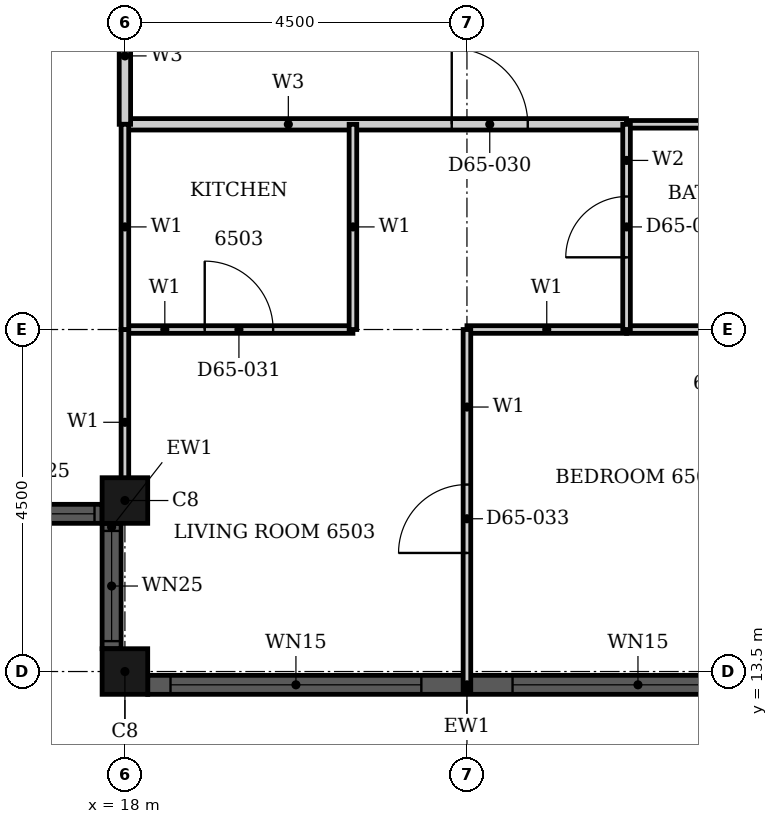
"""IFC4 building model, lengths in metres.
Left out: names, types, materials, properties, quantities, classifications, styles, units other than length and angle.
Written with IfcOpenShell. Run it as: python <this file> out.ifc"""

import sys

from ifc_helpers import new_model, si_unit, direction, frame, frame_2d, origin, origin_2d, place, context, subcontext, project, spatial, rectangle, hollow_rectangle, extrude, element, fill, save


model = new_model("IFC4")
c1 = context("Model", 3, precision=1e-05, world=origin(), true_north=direction((0.0, 1.0)))
c2 = subcontext(c1, "Body", "Model", "MODEL_VIEW")
j1 = project(units=[si_unit("LENGTHUNIT", "METRE"), si_unit("PLANEANGLEUNIT", "RADIAN")], contexts=[c1])
p1 = place(None, origin())
s1 = spatial("IfcSite", under=j1, at=p1, CompositionType="ELEMENT")
p2 = place(p1, origin())
s2 = spatial("IfcBuilding", under=s1, at=p2, CompositionType="ELEMENT")
p3 = place(p2, frame((0.0, 0.0, 256.4)))
s3 = spatial("IfcBuildingStorey", under=s2, at=p3, CompositionType="ELEMENT", Elevation=256.4)
for number, where, z_axis, x_axis in (
    (1, (18.0, 15.75, 0.0), (0.0, 0.0, 1.0), (1.0, 0.0, 0.0)),
    (2, (18.0, 13.5, 0.0), (0.0, 0.0, 1.0), (1.0, 0.0, 0.0)),
):
    element("IfcColumn", number, at=place(p3, frame(where, z_axis=z_axis, x_axis=x_axis)), inside=s3, PredefinedType="COLUMN", context=c2, shape_type="SweptSolid", body=[
        extrude(hollow_rectangle(XDim=0.6, YDim=0.6, WallThickness=0.02, at=origin_2d()), origin(), (0.0, 0.0, 1.0), 3.7),
    ])
p4 = place(p3, frame((16.05, 15.575, 0.0), z_axis=(0.0, 0.0, 1.0), x_axis=(1.0, 0.0, 0.0)))
e3 = element("IfcWall", 3, at=p4, inside=s3, PredefinedType="SOLIDWALL", context=c2, shape_type="SweptSolid", body=[
    extrude(rectangle(XDim=1.65, YDim=0.25, at=frame_2d((0.825, 0.0))), origin(), (0.0, 0.0, 1.0), 3.7),
])
p5 = place(p4, frame((0.1, 0.0, 0.9)))
e4 = element("IfcOpeningElement", 4, at=p5, cuts=e3, PredefinedType="OPENING", context=c2, shape_type="SweptSolid", body=[
    extrude(rectangle(XDim=1.45, YDim=1.85, at=frame_2d((0.725, 0.925))), frame((0.0, 0.135, 0.0), z_axis=(0.0, -1.0, 0.0), x_axis=(1.0, 0.0, 0.0)), (0.0, 0.0, 1.0), 0.27),
])
p6 = place(p3, frame((17.825, 15.45, 0.0), z_axis=(0.0, 0.0, 1.0), x_axis=(0.0, -1.0, 0.0)))
e5 = element("IfcWall", 5, at=p6, inside=s3, PredefinedType="SOLIDWALL", context=c2, shape_type="SweptSolid", body=[
    extrude(rectangle(XDim=1.65, YDim=0.25, at=frame_2d((0.825, 0.0))), origin(), (0.0, 0.0, 1.0), 3.7),
])
p7 = place(p6, frame((0.1, 0.0, 0.9)))
e6 = element("IfcOpeningElement", 6, at=p7, cuts=e5, PredefinedType="OPENING", context=c2, shape_type="SweptSolid", body=[
    extrude(rectangle(XDim=1.45, YDim=1.85, at=frame_2d((0.725, 0.925))), frame((0.0, 0.135, 0.0), z_axis=(0.0, -1.0, 0.0), x_axis=(1.0, 0.0, 0.0)), (0.0, 0.0, 1.0), 0.27),
])
p8 = place(p3, frame((18.3, 13.325, 0.0), z_axis=(0.0, 0.0, 1.0), x_axis=(1.0, 0.0, 0.0)))
e7 = element("IfcWall", 7, at=p8, inside=s3, PredefinedType="SOLIDWALL", context=c2, shape_type="SweptSolid", body=[
    extrude(rectangle(XDim=8.4, YDim=0.25, at=frame_2d((4.2, 0.0))), origin(), (0.0, 0.0, 1.0), 3.7),
])
p9 = place(p8, frame((0.3, 0.0, 0.45)))
e8 = element("IfcOpeningElement", 8, at=p9, cuts=e7, PredefinedType="OPENING", context=c2, shape_type="SweptSolid", body=[
    extrude(rectangle(XDim=3.3, YDim=2.3, at=frame_2d((1.65, 1.15))), frame((0.0, 0.135, 0.0), z_axis=(0.0, -1.0, 0.0), x_axis=(1.0, 0.0, 0.0)), (0.0, 0.0, 1.0), 0.27),
])
p10 = place(p8, frame((4.8, 0.0, 0.45)))
e9 = element("IfcOpeningElement", 9, at=p10, cuts=e7, PredefinedType="OPENING", context=c2, shape_type="SweptSolid", body=[
    extrude(rectangle(XDim=3.3, YDim=2.3, at=frame_2d((1.65, 1.15))), frame((0.0, 0.135, 0.0), z_axis=(0.0, -1.0, 0.0), x_axis=(1.0, 0.0, 0.0)), (0.0, 0.0, 1.0), 0.27),
])
p11 = place(p3, frame((18.0, 20.7, 0.0), z_axis=(0.0, 0.0, 1.0), x_axis=(1.0, 0.0, 0.0)))
e10 = element("IfcWall", 10, at=p11, inside=s3, PredefinedType="PARTITIONING", context=c2, shape_type="SweptSolid", body=[
    extrude(rectangle(XDim=6.6, YDim=0.15, at=frame_2d((3.3, 0.0))), origin(), (0.0, 0.0, 1.0), 3.4),
])
p12 = place(p11, frame((4.3, 0.0, 0.0)))
e11 = element("IfcOpeningElement", 11, at=p12, cuts=e10, PredefinedType="OPENING", context=c2, shape_type="SweptSolid", body=[
    extrude(rectangle(XDim=1.0, YDim=2.2, at=frame_2d((0.5, 1.1))), frame((0.0, 0.085, 0.0), z_axis=(0.0, -1.0, 0.0), x_axis=(1.0, 0.0, 0.0)), (0.0, 0.0, 1.0), 0.17),
])
p13 = place(p3, frame((18.0, 20.7, 0.0), z_axis=(0.0, 0.0, 1.0), x_axis=(0.0, 1.0, 0.0)))
e12 = element("IfcWall", 12, at=p13, inside=s3, PredefinedType="PARTITIONING", context=c2, shape_type="SweptSolid", body=[
    extrude(rectangle(XDim=1.8, YDim=0.15, at=frame_2d((0.9, 0.0))), origin(), (0.0, 0.0, 1.0), 3.4),
])
p14 = place(p3, frame((22.5, 18.0, 0.0), z_axis=(0.0, 0.0, 1.0), x_axis=(1.0, 0.0, 0.0)))
e13 = element("IfcWall", 13, at=p14, inside=s3, PredefinedType="PARTITIONING", context=c2, shape_type="SweptSolid", body=[
    extrude(rectangle(XDim=2.1, YDim=0.1, at=frame_2d((1.05, 0.0))), origin(), (0.0, 0.0, 1.0), 3.4),
])
p15 = place(p3, frame((18.0, 18.0, 0.0), z_axis=(0.0, 0.0, 1.0), x_axis=(1.0, 0.0, 0.0)))
e14 = element("IfcWall", 14, at=p15, inside=s3, PredefinedType="PARTITIONING", context=c2, shape_type="SweptSolid", body=[
    extrude(rectangle(XDim=3.0, YDim=0.1, at=frame_2d((1.5, 0.0))), origin(), (0.0, 0.0, 1.0), 3.4),
])
p16 = place(p15, frame((1.05, 0.0, 0.0)))
e15 = element("IfcOpeningElement", 15, at=p16, cuts=e14, PredefinedType="OPENING", context=c2, shape_type="SweptSolid", body=[
    extrude(rectangle(XDim=0.9, YDim=2.1, at=frame_2d((0.45, 1.05))), frame((0.0, 0.06, 0.0), z_axis=(0.0, -1.0, 0.0), x_axis=(1.0, 0.0, 0.0)), (0.0, 0.0, 1.0), 0.12),
])
p17 = place(p3, frame((18.0, 15.56, 0.0), z_axis=(0.0, 0.0, 1.0), x_axis=(0.0, 1.0, 0.0)))
e16 = element("IfcWall", 16, at=p17, inside=s3, PredefinedType="PARTITIONING", context=c2, shape_type="SweptSolid", body=[
    extrude(rectangle(XDim=2.439, YDim=0.1, at=frame_2d((1.219, 0.0))), origin(), (0.0, 0.0, 1.0), 3.4),
])
for number, where, z_axis, x_axis in (
    (17, (18.0, 18.0, 0.0), (0.0, 0.0, 1.0), (0.0, 1.0, 0.0)),
    (18, (21.0, 18.0, 0.0), (0.0, 0.0, 1.0), (0.0, 1.0, 0.0)),
):
    element("IfcWall", number, at=place(p3, frame(where, z_axis=z_axis, x_axis=x_axis)), inside=s3, PredefinedType="PARTITIONING", context=c2, shape_type="SweptSolid", body=[
        extrude(rectangle(XDim=2.7, YDim=0.1, at=frame_2d((1.35, 0.0))), origin(), (0.0, 0.0, 1.0), 3.4),
    ])
p18 = place(p3, frame((22.5, 13.26, 0.0), z_axis=(0.0, 0.0, 1.0), x_axis=(0.0, 1.0, 0.0)))
e19 = element("IfcWall", 19, at=p18, inside=s3, PredefinedType="PARTITIONING", context=c2, shape_type="SweptSolid", body=[
    extrude(rectangle(XDim=4.74, YDim=0.1, at=frame_2d((2.37, 0.0))), origin(), (0.0, 0.0, 1.0), 3.4),
])
p19 = place(p18, frame((1.8, 0.0, 0.0)))
e20 = element("IfcOpeningElement", 20, at=p19, cuts=e19, PredefinedType="OPENING", context=c2, shape_type="SweptSolid", body=[
    extrude(rectangle(XDim=0.9, YDim=2.1, at=frame_2d((0.45, 1.05))), frame((0.0, 0.06, 0.0), z_axis=(0.0, -1.0, 0.0), x_axis=(1.0, 0.0, 0.0)), (0.0, 0.0, 1.0), 0.12),
])
for number, where, z_axis, x_axis in (
    (21, (24.6, 18.0, 0.0), (0.0, 0.0, 1.0), (1.0, 0.0, 0.0)),
    (22, (24.6, 20.7, 0.0), (0.0, 0.0, 1.0), (1.0, 0.0, 0.0)),
):
    element("IfcWall", number, at=place(p3, frame(where, z_axis=z_axis, x_axis=x_axis)), inside=s3, PredefinedType="PARTITIONING", context=c2, shape_type="SweptSolid", body=[
        extrude(rectangle(XDim=2.4, YDim=0.1, at=frame_2d((1.2, 0.0))), origin(), (0.0, 0.0, 1.0), 3.4),
    ])
p20 = place(p3, frame((24.6, 18.0, 0.0), z_axis=(0.0, 0.0, 1.0), x_axis=(0.0, 1.0, 0.0)))
e23 = element("IfcWall", 23, at=p20, inside=s3, PredefinedType="PARTITIONING", context=c2, shape_type="SweptSolid", body=[
    extrude(rectangle(XDim=2.7, YDim=0.1, at=frame_2d((1.35, 0.0))), origin(), (0.0, 0.0, 1.0), 3.4),
])
p21 = place(p20, frame((0.95, 0.0, 0.0)))
e24 = element("IfcOpeningElement", 24, at=p21, cuts=e23, PredefinedType="OPENING", context=c2, shape_type="SweptSolid", body=[
    extrude(rectangle(XDim=0.8, YDim=2.1, at=frame_2d((0.4, 1.05))), frame((0.0, 0.06, 0.0), z_axis=(0.0, -1.0, 0.0), x_axis=(1.0, 0.0, 0.0)), (0.0, 0.0, 1.0), 0.12),
])
p22 = place(p5, origin())
e25 = element("IfcWindow", 25, at=p22, inside=s3, PartitioningType="SINGLE_PANEL", PredefinedType="WINDOW", context=c2, shape_type="SweptSolid", body=[
    extrude(rectangle(XDim=1.45, YDim=1.85, at=frame_2d((0.725, 0.925))), frame((0.0, 0.03, 0.0), z_axis=(0.0, -1.0, 0.0), x_axis=(1.0, 0.0, 0.0)), (0.0, 0.0, 1.0), 0.06),
])
fill(e4, e25)
p23 = place(p7, origin())
e26 = element("IfcWindow", 26, at=p23, inside=s3, PartitioningType="SINGLE_PANEL", PredefinedType="WINDOW", context=c2, shape_type="SweptSolid", body=[
    extrude(rectangle(XDim=1.45, YDim=1.85, at=frame_2d((0.725, 0.925))), frame((0.0, 0.03, 0.0), z_axis=(0.0, -1.0, 0.0), x_axis=(1.0, 0.0, 0.0)), (0.0, 0.0, 1.0), 0.06),
])
fill(e6, e26)
p24 = place(p9, origin())
e27 = element("IfcWindow", 27, at=p24, inside=s3, PartitioningType="SINGLE_PANEL", PredefinedType="WINDOW", context=c2, shape_type="SweptSolid", body=[
    extrude(rectangle(XDim=3.3, YDim=2.3, at=frame_2d((1.65, 1.15))), frame((0.0, 0.03, 0.0), z_axis=(0.0, -1.0, 0.0), x_axis=(1.0, 0.0, 0.0)), (0.0, 0.0, 1.0), 0.06),
])
fill(e8, e27)
p25 = place(p10, origin())
e28 = element("IfcWindow", 28, at=p25, inside=s3, PartitioningType="SINGLE_PANEL", PredefinedType="WINDOW", context=c2, shape_type="SweptSolid", body=[
    extrude(rectangle(XDim=3.3, YDim=2.3, at=frame_2d((1.65, 1.15))), frame((0.0, 0.03, 0.0), z_axis=(0.0, -1.0, 0.0), x_axis=(1.0, 0.0, 0.0)), (0.0, 0.0, 1.0), 0.06),
])
fill(e9, e28)
p26 = place(p12, origin())
e29 = element("IfcDoor", 29, at=p26, inside=s3, OperationType="SINGLE_SWING_LEFT", PredefinedType="DOOR", context=c2, shape_type="SweptSolid", body=[
    extrude(rectangle(XDim=1.0, YDim=2.2, at=frame_2d((0.5, 1.1))), frame((0.0, 0.025, 0.0), z_axis=(0.0, -1.0, 0.0), x_axis=(1.0, 0.0, 0.0)), (0.0, 0.0, 1.0), 0.05),
])
fill(e11, e29)
p27 = place(p16, origin())
e30 = element("IfcDoor", 30, at=p27, inside=s3, OperationType="SINGLE_SWING_RIGHT", PredefinedType="DOOR", context=c2, shape_type="SweptSolid", body=[
    extrude(rectangle(XDim=0.9, YDim=2.1, at=frame_2d((0.45, 1.05))), frame((0.0, 0.025, 0.0), z_axis=(0.0, -1.0, 0.0), x_axis=(1.0, 0.0, 0.0)), (0.0, 0.0, 1.0), 0.05),
])
fill(e15, e30)
p28 = place(p21, origin())
e31 = element("IfcDoor", 31, at=p28, inside=s3, OperationType="SINGLE_SWING_RIGHT", PredefinedType="DOOR", context=c2, shape_type="SweptSolid", body=[
    extrude(rectangle(XDim=0.8, YDim=2.1, at=frame_2d((0.4, 1.05))), frame((0.0, 0.025, 0.0), z_axis=(0.0, -1.0, 0.0), x_axis=(1.0, 0.0, 0.0)), (0.0, 0.0, 1.0), 0.05),
])
fill(e24, e31)
p29 = place(p19, origin())
e32 = element("IfcDoor", 32, at=p29, inside=s3, OperationType="SINGLE_SWING_RIGHT", PredefinedType="DOOR", context=c2, shape_type="SweptSolid", body=[
    extrude(rectangle(XDim=0.9, YDim=2.1, at=frame_2d((0.45, 1.05))), frame((0.0, 0.025, 0.0), z_axis=(0.0, -1.0, 0.0), x_axis=(1.0, 0.0, 0.0)), (0.0, 0.0, 1.0), 0.05),
])
fill(e20, e32)
save(model, sys.argv[1])
